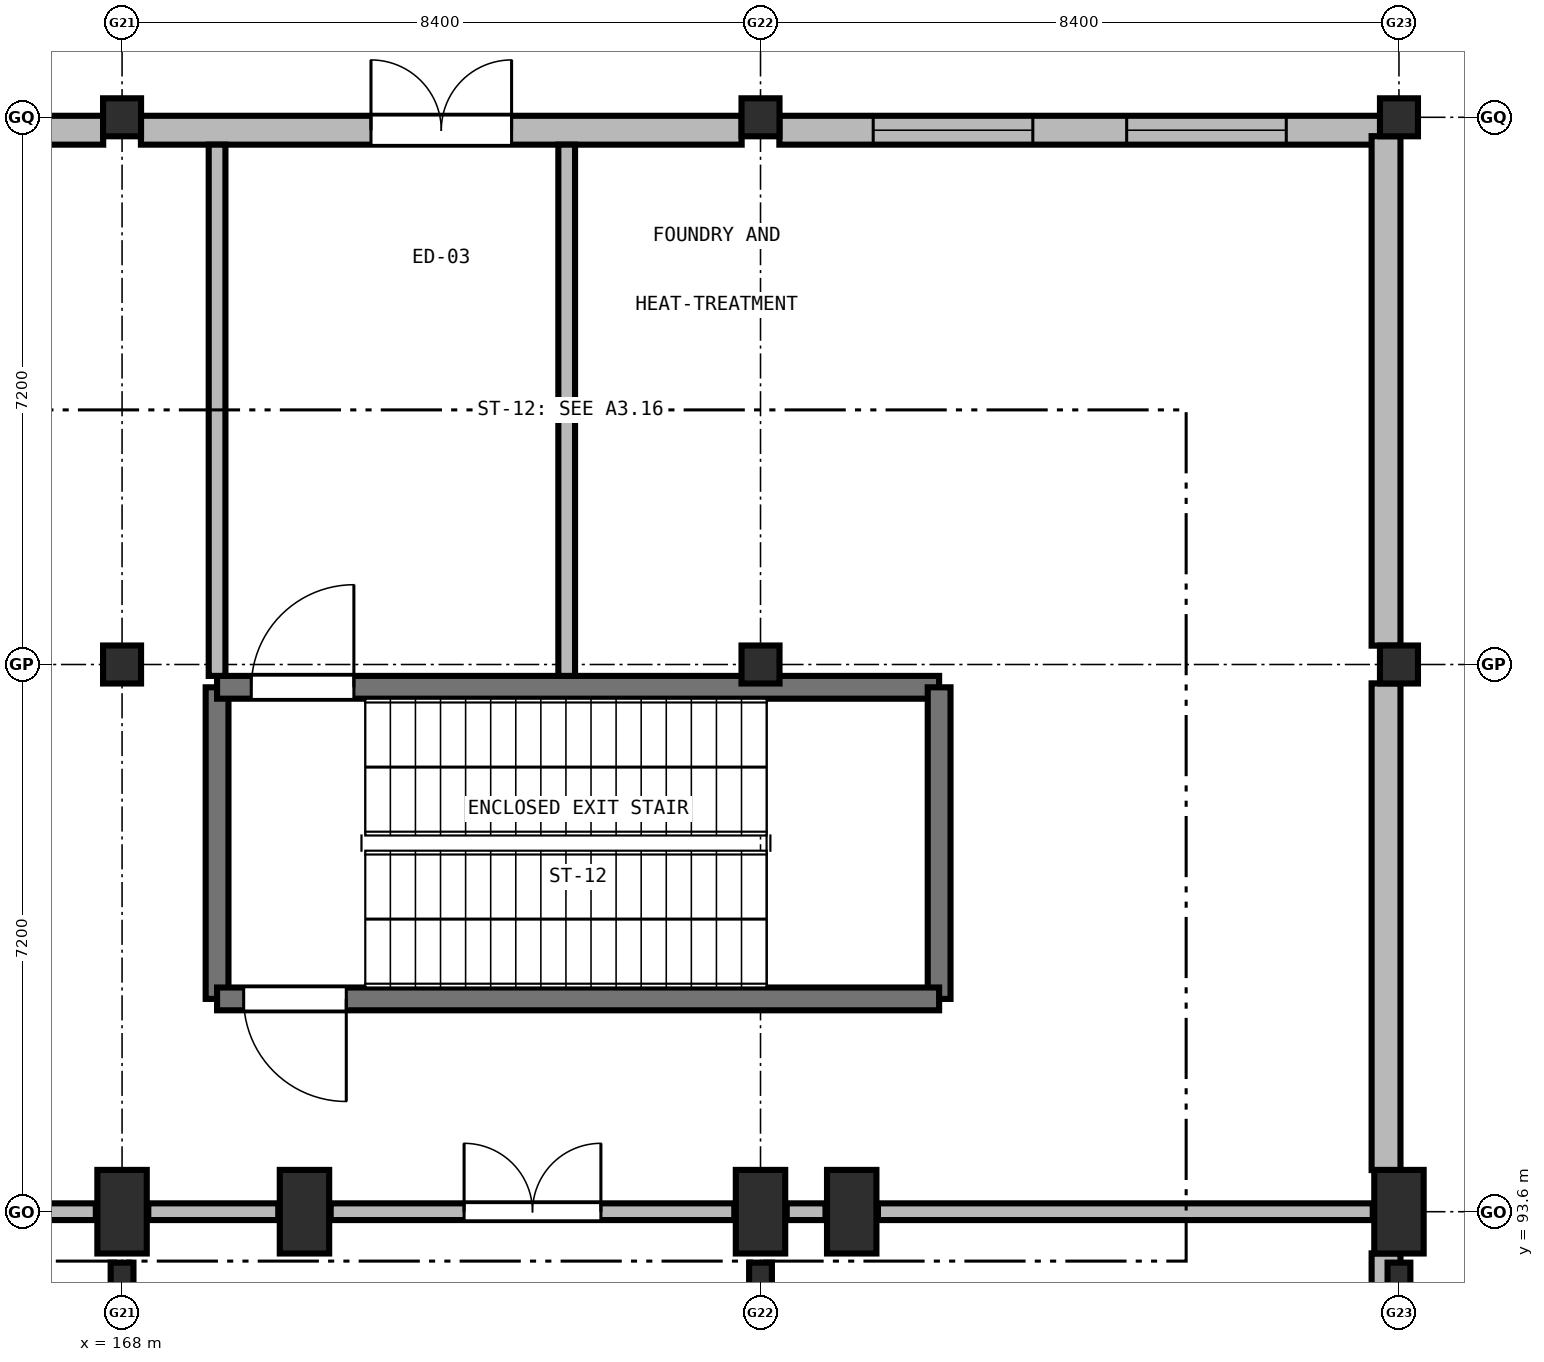
"""IFC4 building model, lengths in metres.
Left out: names, types, materials, properties, quantities, classifications, styles, units other than length and angle.
Written with IfcOpenShell. Run it as: python <this file> out.ifc"""

import sys

from ifc_helpers import new_model, si_unit, direction, frame, frame_2d, origin, origin_2d, place, context, subcontext, project, spatial, rectangle, i_section, extrude, element, fill, save


model = new_model("IFC4")
c1 = context("Model", 3, precision=1e-05, world=origin(), true_north=direction((0.0, 1.0)))
c2 = subcontext(c1, "Body", "Model", "MODEL_VIEW")
j1 = project(units=[si_unit("LENGTHUNIT", "METRE"), si_unit("PLANEANGLEUNIT", "RADIAN")], contexts=[c1])
p1 = place(None, origin())
s1 = spatial("IfcSite", under=j1, at=p1, CompositionType="ELEMENT")
p2 = place(p1, origin())
s2 = spatial("IfcBuilding", under=s1, at=p2, CompositionType="ELEMENT")
p3 = place(p2, origin())
s3 = spatial("IfcBuildingStorey", under=s2, at=p3, CompositionType="ELEMENT", Elevation=0.0)
p4 = place(p3, frame((168.0, 93.6, 0.0), z_axis=(0.0, 0.0, 1.0), x_axis=(1.0, 0.0, 0.0)))
e1 = element("IfcColumn", 1, at=p4, inside=s3, PredefinedType="COLUMN", context=c2, shape_type="SweptSolid", body=[
    extrude(rectangle(XDim=0.65, YDim=1.1, at=origin_2d()), origin(), (0.0, 0.0, 1.0), 5.1),
])
for number, where, z_axis, x_axis in (
    (2, (168.0, 100.8, 0.0), (0.0, 0.0, 1.0), (1.0, 0.0, 0.0)),
    (3, (168.0, 108.0, 0.0), (0.0, 0.0, 1.0), (1.0, 0.0, 0.0)),
):
    element("IfcColumn", number, at=place(p3, frame(where, z_axis=z_axis, x_axis=x_axis)), inside=s3, PredefinedType="COLUMN", context=c2, shape_type="SweptSolid", body=[
        extrude(rectangle(XDim=0.5, YDim=0.5, at=origin_2d()), origin(), (0.0, 0.0, 1.0), 5.1),
    ])
for number, where, z_axis, x_axis in (
    (4, (170.4, 93.6, 0.0), (0.0, 0.0, 1.0), (1.0, 0.0, 0.0)),
    (5, (176.4, 93.6, 0.0), (0.0, 0.0, 1.0), (1.0, 0.0, 0.0)),
):
    element("IfcColumn", number, at=place(p3, frame(where, z_axis=z_axis, x_axis=x_axis)), inside=s3, PredefinedType="COLUMN", context=c2, shape_type="SweptSolid", body=[
        extrude(rectangle(XDim=0.65, YDim=1.1, at=origin_2d()), origin(), (0.0, 0.0, 1.0), 5.1),
    ])
for number, where, z_axis, x_axis in (
    (6, (176.4, 100.8, 0.0), (0.0, 0.0, 1.0), (1.0, 0.0, 0.0)),
    (7, (176.4, 108.0, 0.0), (0.0, 0.0, 1.0), (1.0, 0.0, 0.0)),
):
    element("IfcColumn", number, at=place(p3, frame(where, z_axis=z_axis, x_axis=x_axis)), inside=s3, PredefinedType="COLUMN", context=c2, shape_type="SweptSolid", body=[
        extrude(rectangle(XDim=0.5, YDim=0.5, at=origin_2d()), origin(), (0.0, 0.0, 1.0), 5.1),
    ])
for number, where, z_axis, x_axis in (
    (8, (177.6, 93.6, 0.0), (0.0, 0.0, 1.0), (1.0, 0.0, 0.0)),
    (9, (184.8, 93.6, 0.0), (0.0, 0.0, 1.0), (1.0, 0.0, 0.0)),
):
    element("IfcColumn", number, at=place(p3, frame(where, z_axis=z_axis, x_axis=x_axis)), inside=s3, PredefinedType="COLUMN", context=c2, shape_type="SweptSolid", body=[
        extrude(rectangle(XDim=0.65, YDim=1.1, at=origin_2d()), origin(), (0.0, 0.0, 1.0), 5.1),
    ])
for number, where, z_axis, x_axis in (
    (10, (184.8, 100.8, 0.0), (0.0, 0.0, 1.0), (1.0, 0.0, 0.0)),
    (11, (184.8, 108.0, 0.0), (0.0, 0.0, 1.0), (1.0, 0.0, 0.0)),
):
    element("IfcColumn", number, at=place(p3, frame(where, z_axis=z_axis, x_axis=x_axis)), inside=s3, PredefinedType="COLUMN", context=c2, shape_type="SweptSolid", body=[
        extrude(rectangle(XDim=0.5, YDim=0.5, at=origin_2d()), origin(), (0.0, 0.0, 1.0), 5.1),
    ])
for number, where, z_axis, x_axis in (
    (12, (168.0, 92.75, 0.0), (0.0, 0.0, 1.0), (1.0, 0.0, 0.0)),
    (13, (176.4, 92.75, 0.0), (0.0, 0.0, 1.0), (1.0, 0.0, 0.0)),
    (14, (184.8, 92.75, 0.0), (0.0, 0.0, 1.0), (1.0, 0.0, 0.0)),
):
    element("IfcColumn", number, at=place(p3, frame(where, z_axis=z_axis, x_axis=x_axis)), inside=s3, PredefinedType="COLUMN", context=c2, shape_type="SweptSolid", body=[
        extrude(i_section(OverallWidth=0.3, OverallDepth=0.36, WebThickness=0.012, FlangeThickness=0.022, FilletRadius=0.027, at=origin_2d()), origin(), (0.0, 0.0, 1.0), 7.155),
    ])
p5 = place(p3, frame((159.848, 107.83, 0.0), z_axis=(0.0, 0.0, 1.0), x_axis=(1.0, 0.0, 0.0)))
e15 = element("IfcWall", 15, at=p5, inside=s3, PredefinedType="SOLIDWALL", context=c2, shape_type="SweptSolid", body=[
    extrude(rectangle(XDim=7.904, YDim=0.38, at=frame_2d((3.952, 0.0))), origin(), (0.0, 0.0, 1.0), 4.01),
])
p6 = place(p5, frame((0.968, 0.0, 0.95)))
e16 = element("IfcOpeningElement", 16, at=p6, cuts=e15, PredefinedType="OPENING", context=c2, shape_type="SweptSolid", body=[
    extrude(rectangle(XDim=2.5, YDim=2.05, at=frame_2d((1.25, 1.025))), frame((0.0, 0.2, 0.0), z_axis=(0.0, -1.0, 0.0), x_axis=(1.0, 0.0, 0.0)), (0.0, 0.0, 1.0), 0.4),
])
p7 = place(p5, frame((4.436, 0.0, 0.95)))
e17 = element("IfcOpeningElement", 17, at=p7, cuts=e15, PredefinedType="OPENING", context=c2, shape_type="SweptSolid", body=[
    extrude(rectangle(XDim=2.5, YDim=2.05, at=frame_2d((1.25, 1.025))), frame((0.0, 0.2, 0.0), z_axis=(0.0, -1.0, 0.0), x_axis=(1.0, 0.0, 0.0)), (0.0, 0.0, 1.0), 0.4),
])
p8 = place(p3, frame((168.248, 107.83, 0.0), z_axis=(0.0, 0.0, 1.0), x_axis=(1.0, 0.0, 0.0)))
e18 = element("IfcWall", 18, at=p8, inside=s3, PredefinedType="SOLIDWALL", context=c2, shape_type="SweptSolid", body=[
    extrude(rectangle(XDim=7.904, YDim=0.38, at=frame_2d((3.952, 0.0))), origin(), (0.0, 0.0, 1.0), 4.01),
])
p9 = place(p8, frame((3.027, 0.0, 0.0)))
e19 = element("IfcOpeningElement", 19, at=p9, cuts=e18, PredefinedType="OPENING", context=c2, shape_type="SweptSolid", body=[
    extrude(rectangle(XDim=1.85, YDim=2.3, at=frame_2d((0.925, 1.15))), frame((0.0, 0.2, 0.0), z_axis=(0.0, -1.0, 0.0), x_axis=(1.0, 0.0, 0.0)), (0.0, 0.0, 1.0), 0.4),
])
p10 = place(p3, frame((176.648, 107.83, 0.0), z_axis=(0.0, 0.0, 1.0), x_axis=(1.0, 0.0, 0.0)))
e20 = element("IfcWall", 20, at=p10, inside=s3, PredefinedType="SOLIDWALL", context=c2, shape_type="SweptSolid", body=[
    extrude(rectangle(XDim=7.904, YDim=0.38, at=frame_2d((3.952, 0.0))), origin(), (0.0, 0.0, 1.0), 4.01),
])
p11 = place(p10, frame((1.235, 0.0, 0.95)))
e21 = element("IfcOpeningElement", 21, at=p11, cuts=e20, PredefinedType="OPENING", context=c2, shape_type="SweptSolid", body=[
    extrude(rectangle(XDim=2.1, YDim=1.85, at=frame_2d((1.05, 0.925))), frame((0.0, 0.2, 0.0), z_axis=(0.0, -1.0, 0.0), x_axis=(1.0, 0.0, 0.0)), (0.0, 0.0, 1.0), 0.4),
])
p12 = place(p10, frame((4.569, 0.0, 0.95)))
e22 = element("IfcOpeningElement", 22, at=p12, cuts=e20, PredefinedType="OPENING", context=c2, shape_type="SweptSolid", body=[
    extrude(rectangle(XDim=2.1, YDim=1.85, at=frame_2d((1.05, 0.925))), frame((0.0, 0.2, 0.0), z_axis=(0.0, -1.0, 0.0), x_axis=(1.0, 0.0, 0.0)), (0.0, 0.0, 1.0), 0.4),
])
p13 = place(p3, frame((184.63, 107.752, 0.0), z_axis=(0.0, 0.0, 1.0), x_axis=(0.0, -1.0, 0.0)))
e23 = element("IfcWall", 23, at=p13, inside=s3, PredefinedType="SOLIDWALL", context=c2, shape_type="SweptSolid", body=[
    extrude(rectangle(XDim=6.704, YDim=0.38, at=frame_2d((3.352, 0.0))), origin(), (0.0, 0.0, 1.0), 4.11),
])
p14 = place(p3, frame((184.63, 100.552, 0.0), z_axis=(0.0, 0.0, 1.0), x_axis=(0.0, -1.0, 0.0)))
e24 = element("IfcWall", 24, at=p14, inside=s3, PredefinedType="SOLIDWALL", context=c2, shape_type="SweptSolid", body=[
    extrude(rectangle(XDim=6.404, YDim=0.38, at=frame_2d((3.202, 0.0))), origin(), (0.0, 0.0, 1.0), 4.11),
])
p15 = place(p3, frame((184.63, 93.052, 0.0), z_axis=(0.0, 0.0, 1.0), x_axis=(0.0, -1.0, 0.0)))
e25 = element("IfcWall", 25, at=p15, inside=s3, PredefinedType="SOLIDWALL", context=c2, shape_type="SweptSolid", body=[
    extrude(rectangle(XDim=6.454, YDim=0.38, at=frame_2d((3.227, 0.0))), origin(), (0.0, 0.0, 1.0), 4.76),
])
p16 = place(p15, frame((2.377, 0.0, 0.95)))
e26 = element("IfcOpeningElement", 26, at=p16, cuts=e25, PredefinedType="OPENING", context=c2, shape_type="SweptSolid", body=[
    extrude(rectangle(XDim=1.7, YDim=1.65, at=frame_2d((0.85, 0.825))), frame((0.0, 0.2, 0.0), z_axis=(0.0, -1.0, 0.0), x_axis=(1.0, 0.0, 0.0)), (0.0, 0.0, 1.0), 0.4),
])
p17 = place(p3, frame((169.25, 96.4, 0.0), z_axis=(0.0, 0.0, 1.0), x_axis=(0.0, 1.0, 0.0)))
e27 = element("IfcWall", 27, at=p17, inside=s3, PredefinedType="SHEAR", context=c2, shape_type="SweptSolid", body=[
    extrude(rectangle(XDim=4.1, YDim=0.3, at=frame_2d((2.05, 0.0))), origin(), (0.0, 0.0, 1.0), 4.82),
])
p18 = place(p3, frame((169.25, 100.5, 0.0), z_axis=(0.0, 0.0, 1.0), x_axis=(1.0, 0.0, 0.0)))
e28 = element("IfcWall", 28, at=p18, inside=s3, PredefinedType="SHEAR", context=c2, shape_type="SweptSolid", body=[
    extrude(rectangle(XDim=9.5, YDim=0.3, at=frame_2d((4.75, 0.0))), origin(), (0.0, 0.0, 1.0), 4.82),
])
p19 = place(p18, frame((0.45, 0.0, 0.0)))
e29 = element("IfcOpeningElement", 29, at=p19, cuts=e28, PredefinedType="OPENING", context=c2, shape_type="SweptSolid", body=[
    extrude(rectangle(XDim=1.35, YDim=2.2, at=frame_2d((0.675, 1.1))), frame((0.0, 0.16, 0.0), z_axis=(0.0, -1.0, 0.0), x_axis=(1.0, 0.0, 0.0)), (0.0, 0.0, 1.0), 0.32),
])
p20 = place(p3, frame((178.75, 100.5, 0.0), z_axis=(0.0, 0.0, 1.0), x_axis=(0.0, -1.0, 0.0)))
e30 = element("IfcWall", 30, at=p20, inside=s3, PredefinedType="SHEAR", context=c2, shape_type="SweptSolid", body=[
    extrude(rectangle(XDim=4.1, YDim=0.3, at=frame_2d((2.05, 0.0))), origin(), (0.0, 0.0, 1.0), 4.82),
])
p21 = place(p3, frame((178.75, 96.4, 0.0), z_axis=(0.0, 0.0, 1.0), x_axis=(-1.0, 0.0, 0.0)))
e31 = element("IfcWall", 31, at=p21, inside=s3, PredefinedType="SHEAR", context=c2, shape_type="SweptSolid", body=[
    extrude(rectangle(XDim=9.5, YDim=0.3, at=frame_2d((4.75, 0.0))), origin(), (0.0, 0.0, 1.0), 4.82),
])
p22 = place(p21, frame((7.8, 0.0, 0.0)))
e32 = element("IfcOpeningElement", 32, at=p22, cuts=e31, PredefinedType="OPENING", context=c2, shape_type="SweptSolid", body=[
    extrude(rectangle(XDim=1.35, YDim=2.2, at=frame_2d((0.675, 1.1))), frame((0.0, 0.16, 0.0), z_axis=(0.0, -1.0, 0.0), x_axis=(1.0, 0.0, 0.0)), (0.0, 0.0, 1.0), 0.32),
])
p23 = place(p3, frame((163.545, 93.6, 0.0), z_axis=(0.0, 0.0, 1.0), x_axis=(1.0, 0.0, 0.0)))
e33 = element("IfcWall", 33, at=p23, inside=s3, PredefinedType="SOLIDWALL", context=c2, shape_type="SweptSolid", body=[
    extrude(rectangle(XDim=4.11, YDim=0.22, at=frame_2d((2.055, 0.0))), origin(), (0.0, 0.0, 1.0), 4.105),
])
p24 = place(p3, frame((168.345, 93.6, 0.0), z_axis=(0.0, 0.0, 1.0), x_axis=(1.0, 0.0, 0.0)))
e34 = element("IfcWall", 34, at=p24, inside=s3, PredefinedType="SOLIDWALL", context=c2, shape_type="SweptSolid", body=[
    extrude(rectangle(XDim=1.71, YDim=0.22, at=frame_2d((0.855, 0.0))), origin(), (0.0, 0.0, 1.0), 4.105),
])
p25 = place(p3, frame((170.745, 93.6, 0.0), z_axis=(0.0, 0.0, 1.0), x_axis=(1.0, 0.0, 0.0)))
e35 = element("IfcWall", 35, at=p25, inside=s3, PredefinedType="SOLIDWALL", context=c2, shape_type="SweptSolid", body=[
    extrude(rectangle(XDim=5.31, YDim=0.22, at=frame_2d((2.655, 0.0))), origin(), (0.0, 0.0, 1.0), 4.303),
])
p26 = place(p25, frame((1.755, 0.0, 0.0)))
e36 = element("IfcOpeningElement", 36, at=p26, cuts=e35, PredefinedType="OPENING", context=c2, shape_type="SweptSolid", body=[
    extrude(rectangle(XDim=1.8, YDim=2.2, at=frame_2d((0.9, 1.1))), frame((0.0, 0.12, 0.0), z_axis=(0.0, -1.0, 0.0), x_axis=(1.0, 0.0, 0.0)), (0.0, 0.0, 1.0), 0.24),
])
p27 = place(p3, frame((176.745, 93.6, 0.0), z_axis=(0.0, 0.0, 1.0), x_axis=(1.0, 0.0, 0.0)))
e37 = element("IfcWall", 37, at=p27, inside=s3, PredefinedType="SOLIDWALL", context=c2, shape_type="SweptSolid", body=[
    extrude(rectangle(XDim=0.51, YDim=0.22, at=frame_2d((0.255, 0.0))), origin(), (0.0, 0.0, 1.0), 4.303),
])
p28 = place(p3, frame((177.945, 93.6, 0.0), z_axis=(0.0, 0.0, 1.0), x_axis=(1.0, 0.0, 0.0)))
e38 = element("IfcWall", 38, at=p28, inside=s3, PredefinedType="SOLIDWALL", context=c2, shape_type="SweptSolid", body=[
    extrude(rectangle(XDim=6.51, YDim=0.22, at=frame_2d((3.255, 0.0))), origin(), (0.0, 0.0, 1.0), 4.105),
])
for number, where, z_axis, x_axis in (
    (39, (169.25, 100.65, 0.0), (0.0, 0.0, 1.0), (0.0, 1.0, 0.0)),
    (40, (173.85, 100.65, 0.0), (0.0, 0.0, 1.0), (0.0, 1.0, 0.0)),
):
    element("IfcWall", number, at=place(p3, frame(where, z_axis=z_axis, x_axis=x_axis)), inside=s3, PredefinedType="SOLIDWALL", context=c2, shape_type="SweptSolid", body=[
        extrude(rectangle(XDim=6.99, YDim=0.22, at=frame_2d((3.495, 0.0))), origin(), (0.0, 0.0, 1.0), 4.005),
    ])
p29 = place(p9, origin())
e41 = element("IfcDoor", 41, at=p29, inside=s3, OperationType="DOUBLE_DOOR_SINGLE_SWING", PredefinedType="DOOR", context=c2, shape_type="SweptSolid", body=[
    extrude(rectangle(XDim=1.85, YDim=2.3, at=frame_2d((0.925, 1.15))), frame((0.0, 0.025, 0.0), z_axis=(0.0, -1.0, 0.0), x_axis=(1.0, 0.0, 0.0)), (0.0, 0.0, 1.0), 0.05),
])
fill(e19, e41)
p30 = place(p11, origin())
e42 = element("IfcWindow", 42, at=p30, inside=s3, PartitioningType="SINGLE_PANEL", PredefinedType="WINDOW", context=c2, shape_type="SweptSolid", body=[
    extrude(rectangle(XDim=2.1, YDim=1.85, at=frame_2d((1.05, 0.925))), frame((0.0, 0.03, 0.0), z_axis=(0.0, -1.0, 0.0), x_axis=(1.0, 0.0, 0.0)), (0.0, 0.0, 1.0), 0.06),
])
fill(e21, e42)
p31 = place(p12, origin())
e43 = element("IfcWindow", 43, at=p31, inside=s3, PartitioningType="SINGLE_PANEL", PredefinedType="WINDOW", context=c2, shape_type="SweptSolid", body=[
    extrude(rectangle(XDim=2.1, YDim=1.85, at=frame_2d((1.05, 0.925))), frame((0.0, 0.03, 0.0), z_axis=(0.0, -1.0, 0.0), x_axis=(1.0, 0.0, 0.0)), (0.0, 0.0, 1.0), 0.06),
])
fill(e22, e43)
p32 = place(p22, origin())
e44 = element("IfcDoor", 44, at=p32, inside=s3, OperationType="SINGLE_SWING_LEFT", PredefinedType="DOOR", context=c2, shape_type="SweptSolid", body=[
    extrude(rectangle(XDim=1.35, YDim=2.2, at=frame_2d((0.675, 1.1))), frame((0.0, 0.025, 0.0), z_axis=(0.0, -1.0, 0.0), x_axis=(1.0, 0.0, 0.0)), (0.0, 0.0, 1.0), 0.05),
])
fill(e32, e44)
p33 = place(p26, origin())
e45 = element("IfcDoor", 45, at=p33, inside=s3, OperationType="DOUBLE_DOOR_SINGLE_SWING", PredefinedType="DOOR", context=c2, shape_type="SweptSolid", body=[
    extrude(rectangle(XDim=1.8, YDim=2.2, at=frame_2d((0.9, 1.1))), frame((0.0, 0.025, 0.0), z_axis=(0.0, -1.0, 0.0), x_axis=(1.0, 0.0, 0.0)), (0.0, 0.0, 1.0), 0.05),
])
fill(e36, e45)
p34 = place(p19, origin())
e46 = element("IfcDoor", 46, at=p34, inside=s3, OperationType="SINGLE_SWING_RIGHT", PredefinedType="DOOR", context=c2, shape_type="SweptSolid", body=[
    extrude(rectangle(XDim=1.35, YDim=2.2, at=frame_2d((0.675, 1.1))), frame((0.0, 0.025, 0.0), z_axis=(0.0, -1.0, 0.0), x_axis=(1.0, 0.0, 0.0)), (0.0, 0.0, 1.0), 0.05),
])
fill(e29, e46)
save(model, sys.argv[1])
